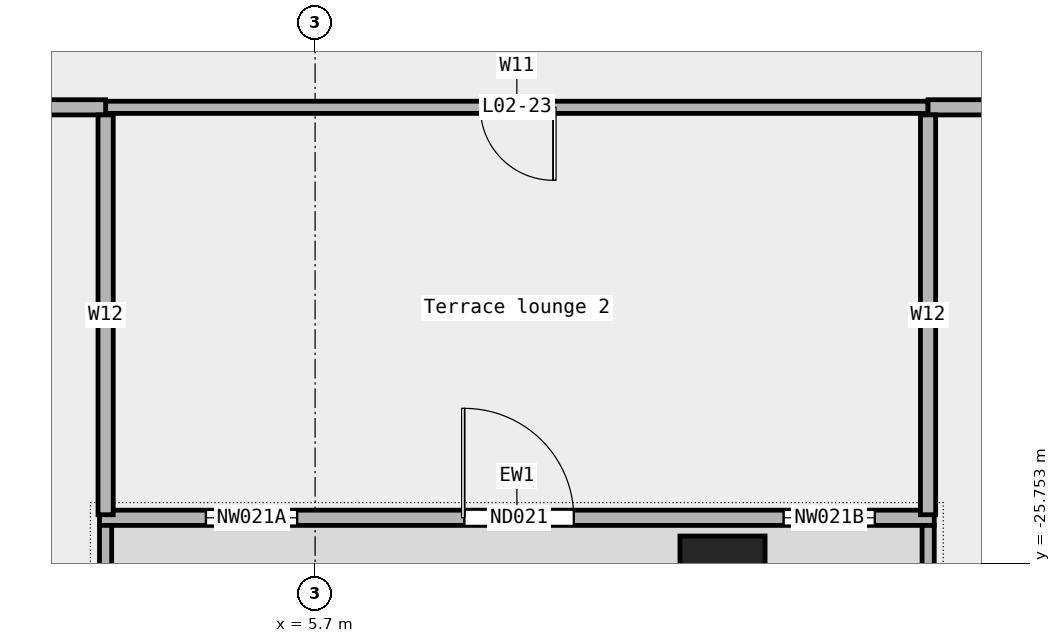
"""IFC4 building model, lengths in metres.
Left out: names, types, materials, properties, quantities, classifications, styles, units other than length and angle.
Written with IfcOpenShell. Run it as: python <this file> out.ifc"""

import sys

from ifc_helpers import new_model, si_unit, direction, frame, frame_2d, origin, origin_2d, place, context, subcontext, project, spatial, rectangle, extrude, element, fill, save


model = new_model("IFC4")
c1 = context("Model", 3, precision=1e-05, world=origin(), true_north=direction((0.0, 1.0)))
c2 = subcontext(c1, "Body", "Model", "MODEL_VIEW")
j1 = project(units=[si_unit("LENGTHUNIT", "METRE"), si_unit("PLANEANGLEUNIT", "RADIAN")], contexts=[c1])
p1 = place(None, origin())
s1 = spatial("IfcSite", under=j1, at=p1, CompositionType="ELEMENT")
p2 = place(p1, origin())
s2 = spatial("IfcBuilding", under=s1, at=p2, CompositionType="ELEMENT")
p3 = place(p2, frame((0.0, 0.0, 14.5)))
s3 = spatial("IfcBuildingStorey", under=s2, at=p3, CompositionType="ELEMENT", Elevation=14.5)
p4 = place(p3, frame((12.4, -26.0, 0.0), z_axis=(0.0, 0.0, 1.0), x_axis=(1.0, 0.0, 0.0)))
e1 = element("IfcColumn", 1, at=p4, inside=s3, PredefinedType="COLUMN", context=c2, shape_type="SweptSolid", body=[
    extrude(rectangle(XDim=1.4, YDim=1.4, at=origin_2d()), origin(), (0.0, 0.0, 1.0), 5.0),
])
p5 = place(p3, frame((2.155, -25.0, 0.0), z_axis=(0.0, 0.0, 1.0), x_axis=(1.0, 0.0, 0.0)))
e2 = element("IfcWall", 2, at=p5, inside=s3, PredefinedType="STANDARD", context=c2, shape_type="SweptSolid", body=[
    extrude(rectangle(XDim=13.727, YDim=0.25, at=frame_2d((6.864, 0.0))), origin(), (0.0, 0.0, 1.0), 5.0),
])
p6 = place(p5, frame((1.75, 0.0, 0.45)))
e3 = element("IfcOpeningElement", 3, at=p6, cuts=e2, PredefinedType="OPENING", context=c2, shape_type="SweptSolid", body=[
    extrude(rectangle(XDim=1.5, YDim=3.0, at=frame_2d((0.75, 1.5))), frame((0.0, 0.137, 0.0), z_axis=(0.0, -1.0, 0.0), x_axis=(1.0, 0.0, 0.0)), (0.0, 0.0, 1.0), 0.274),
])
p7 = place(p5, frame((6.0, 0.0, 0.0)))
e4 = element("IfcOpeningElement", 4, at=p7, cuts=e2, PredefinedType="OPENING", context=c2, shape_type="SweptSolid", body=[
    extrude(rectangle(XDim=1.8, YDim=2.4, at=frame_2d((0.9, 1.2))), frame((0.0, 0.137, 0.0), z_axis=(0.0, -1.0, 0.0), x_axis=(1.0, 0.0, 0.0)), (0.0, 0.0, 1.0), 0.274),
])
p8 = place(p5, frame((11.25, 0.0, 0.45)))
e5 = element("IfcOpeningElement", 5, at=p8, cuts=e2, PredefinedType="OPENING", context=c2, shape_type="SweptSolid", body=[
    extrude(rectangle(XDim=1.5, YDim=3.0, at=frame_2d((0.75, 1.5))), frame((0.0, 0.137, 0.0), z_axis=(0.0, -1.0, 0.0), x_axis=(1.0, 0.0, 0.0)), (0.0, 0.0, 1.0), 0.274),
])
for number, where, z_axis, x_axis in (
    (6, (2.255, -27.0, 0.0), (0.0, 0.0, 1.0), (0.0, 1.0, 0.0)),
    (7, (15.782, -27.0, 0.0), (0.0, 0.0, 1.0), (0.0, 1.0, 0.0)),
):
    element("IfcWall", number, at=place(p3, frame(where, z_axis=z_axis, x_axis=x_axis)), inside=s3, PredefinedType="STANDARD", context=c2, shape_type="SweptSolid", body=[
        extrude(rectangle(XDim=1.875, YDim=0.2, at=frame_2d((0.938, 0.0))), origin(), (0.0, 0.0, 1.0), 5.0),
    ])
p9 = place(p3, frame((2.255, -18.25, 0.0), z_axis=(0.0, 0.0, 1.0), x_axis=(1.0, 0.0, 0.0)))
e8 = element("IfcWall", 8, at=p9, inside=s3, PredefinedType="PARTITIONING", context=c2, shape_type="SweptSolid", body=[
    extrude(rectangle(XDim=13.525, YDim=0.2, at=frame_2d((6.763, 0.0))), origin(), (0.0, 0.0, 1.0), 5.0),
])
p10 = place(p9, frame((6.163, 0.0, 0.0)))
e9 = element("IfcOpeningElement", 9, at=p10, cuts=e8, PredefinedType="OPENING", context=c2, shape_type="SweptSolid", body=[
    extrude(rectangle(XDim=1.2, YDim=2.1, at=frame_2d((0.6, 1.05))), frame((0.0, 0.112, 0.0), z_axis=(0.0, -1.0, 0.0), x_axis=(1.0, 0.0, 0.0)), (0.0, 0.0, 1.0), 0.224),
])
p11 = place(p3, frame((-30.75, -18.25, 0.0), z_axis=(0.0, 0.0, 1.0), x_axis=(1.0, 0.0, 0.0)))
e10 = element("IfcWall", 10, at=p11, inside=s3, PredefinedType="PARTITIONING", context=c2, shape_type="SweptSolid", body=[
    extrude(rectangle(XDim=33.005, YDim=0.25, at=frame_2d((16.502, 0.0))), origin(), (0.0, 0.0, 1.0), 5.0),
])
p12 = place(p11, frame((9.482, 0.0, 0.0)))
e11 = element("IfcOpeningElement", 11, at=p12, cuts=e10, PredefinedType="OPENING", context=c2, shape_type="SweptSolid", body=[
    extrude(rectangle(XDim=1.8, YDim=2.1, at=frame_2d((0.9, 1.05))), frame((0.0, 0.137, 0.0), z_axis=(0.0, -1.0, 0.0), x_axis=(1.0, 0.0, 0.0)), (0.0, 0.0, 1.0), 0.274),
])
p13 = place(p11, frame((25.885, 0.0, 0.0)))
e12 = element("IfcOpeningElement", 12, at=p13, cuts=e10, PredefinedType="OPENING", context=c2, shape_type="SweptSolid", body=[
    extrude(rectangle(XDim=1.8, YDim=2.1, at=frame_2d((0.9, 1.05))), frame((0.0, 0.137, 0.0), z_axis=(0.0, -1.0, 0.0), x_axis=(1.0, 0.0, 0.0)), (0.0, 0.0, 1.0), 0.274),
])
p14 = place(p3, frame((15.78, -18.25, 0.0), z_axis=(0.0, 0.0, 1.0), x_axis=(1.0, 0.0, 0.0)))
e13 = element("IfcWall", 13, at=p14, inside=s3, PredefinedType="PARTITIONING", context=c2, shape_type="SweptSolid", body=[
    extrude(rectangle(XDim=14.97, YDim=0.25, at=frame_2d((7.485, 0.0))), origin(), (0.0, 0.0, 1.0), 5.0),
])
p15 = place(p14, frame((6.485, 0.0, 0.0)))
e14 = element("IfcOpeningElement", 14, at=p15, cuts=e13, PredefinedType="OPENING", context=c2, shape_type="SweptSolid", body=[
    extrude(rectangle(XDim=1.8, YDim=2.1, at=frame_2d((0.9, 1.05))), frame((0.0, 0.137, 0.0), z_axis=(0.0, -1.0, 0.0), x_axis=(1.0, 0.0, 0.0)), (0.0, 0.0, 1.0), 0.274),
])
for number, where, z_axis, x_axis in (
    (15, (2.255, -24.95, 0.0), (0.0, 0.0, 1.0), (0.0, 1.0, 0.0)),
    (16, (15.78, -24.95, 0.0), (0.0, 0.0, 1.0), (0.0, 1.0, 0.0)),
):
    element("IfcWall", number, at=place(p3, frame(where, z_axis=z_axis, x_axis=x_axis)), inside=s3, PredefinedType="PARTITIONING", context=c2, shape_type="SweptSolid", body=[
        extrude(rectangle(XDim=6.575, YDim=0.25, at=frame_2d((3.288, 0.0))), origin(), (0.0, 0.0, 1.0), 5.0),
    ])
p16 = place(p6, origin())
e17 = element("IfcWindow", 17, at=p16, inside=s3, PartitioningType="SINGLE_PANEL", PredefinedType="WINDOW", context=c2, shape_type="SweptSolid", body=[
    extrude(rectangle(XDim=1.5, YDim=3.0, at=frame_2d((0.75, 1.5))), frame((0.0, 0.03, 0.0), z_axis=(0.0, -1.0, 0.0), x_axis=(1.0, 0.0, 0.0)), (0.0, 0.0, 1.0), 0.06),
])
fill(e3, e17)
p17 = place(p7, origin())
e18 = element("IfcDoor", 18, at=p17, inside=s3, OperationType="DOUBLE_DOOR_SINGLE_SWING", PredefinedType="DOOR", context=c2, shape_type="SweptSolid", body=[
    extrude(rectangle(XDim=1.8, YDim=2.4, at=frame_2d((0.9, 1.2))), frame((0.0, 0.025, 0.0), z_axis=(0.0, -1.0, 0.0), x_axis=(1.0, 0.0, 0.0)), (0.0, 0.0, 1.0), 0.05),
])
fill(e4, e18)
p18 = place(p8, origin())
e19 = element("IfcWindow", 19, at=p18, inside=s3, PartitioningType="SINGLE_PANEL", PredefinedType="WINDOW", context=c2, shape_type="SweptSolid", body=[
    extrude(rectangle(XDim=1.5, YDim=3.0, at=frame_2d((0.75, 1.5))), frame((0.0, 0.03, 0.0), z_axis=(0.0, -1.0, 0.0), x_axis=(1.0, 0.0, 0.0)), (0.0, 0.0, 1.0), 0.06),
])
fill(e5, e19)
p19 = place(p10, origin())
e20 = element("IfcDoor", 20, at=p19, inside=s3, OperationType="SINGLE_SWING_LEFT", PredefinedType="DOOR", context=c2, shape_type="SweptSolid", body=[
    extrude(rectangle(XDim=1.2, YDim=2.1, at=frame_2d((0.6, 1.05))), frame((0.0, 0.025, 0.0), z_axis=(0.0, -1.0, 0.0), x_axis=(1.0, 0.0, 0.0)), (0.0, 0.0, 1.0), 0.05),
])
fill(e9, e20)
save(model, sys.argv[1])
